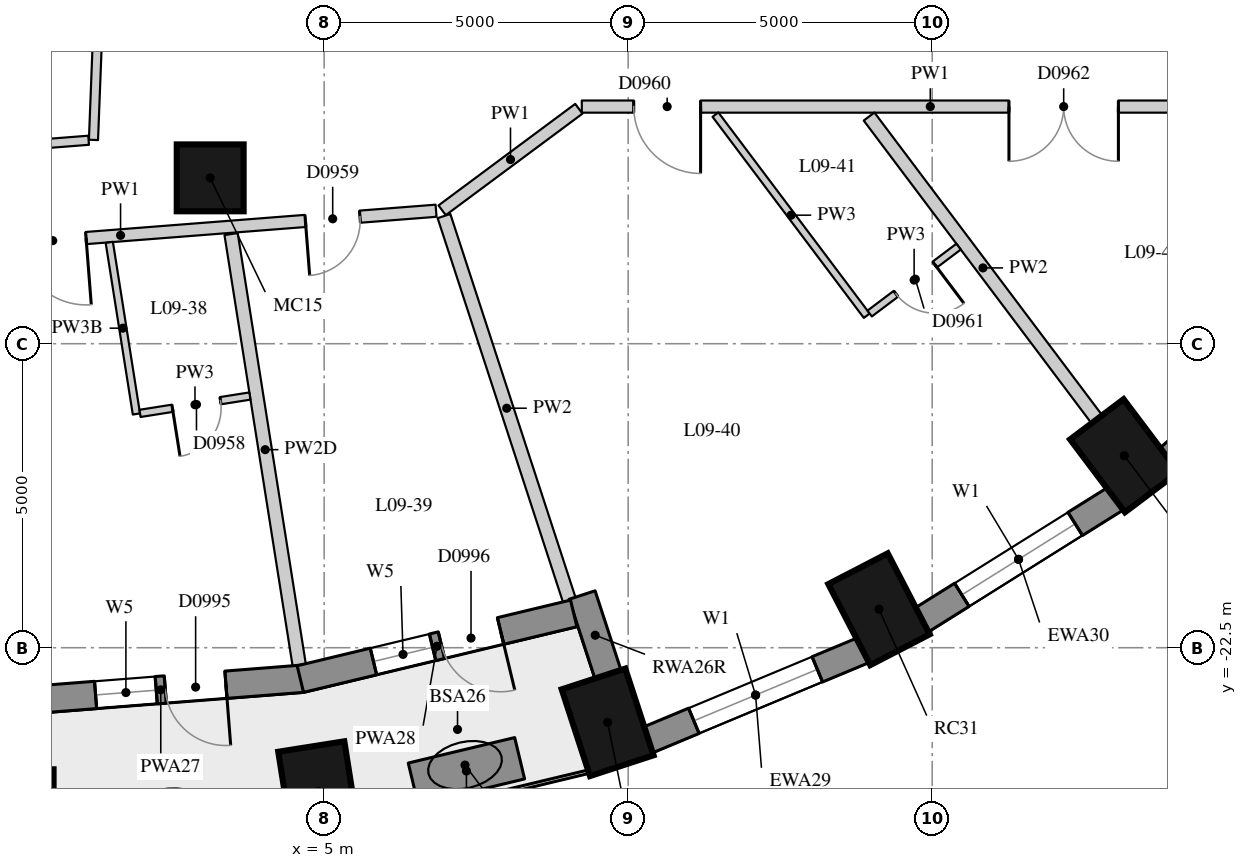
"""IFC4 building model, lengths in metres.
Left out: names, types, materials, properties, quantities, classifications, styles, units other than length and angle.
Written with IfcOpenShell. Run it as: python <this file> out.ifc"""

import sys

from ifc_helpers import new_model, si_unit, direction, frame, frame_2d, origin, origin_2d, place, context, subcontext, project, spatial, rectangle, extrude, element, fill, save


model = new_model("IFC4")
c1 = context("Model", 3, precision=1e-05, world=origin(), true_north=direction((0.0, 1.0)))
c2 = subcontext(c1, "Body", "Model", "MODEL_VIEW")
j1 = project(units=[si_unit("LENGTHUNIT", "METRE"), si_unit("PLANEANGLEUNIT", "RADIAN")], contexts=[c1])
p1 = place(None, origin())
s1 = spatial("IfcSite", under=j1, at=p1, CompositionType="ELEMENT")
p2 = place(p1, origin())
s2 = spatial("IfcBuilding", under=s1, at=p2, CompositionType="ELEMENT")
p3 = place(p2, frame((0.0, 0.0, 38.2)))
s3 = spatial("IfcBuildingStorey", under=s2, at=p3, CompositionType="ELEMENT", Elevation=38.2)
for number, where, z_axis, x_axis in (
    (1, (0.0, -25.25, 0.0), (0.0, 0.0, 1.0), (0.0, -1.0, 0.0)),
    (2, (4.906, -24.866, 0.0), (0.0, 0.0, 1.0), (0.156, -0.988, 0.0)),
    (3, (9.662, -23.727, 0.0), (0.0, 0.0, 1.0), (0.31, -0.951, 0.0)),
    (4, (14.125, -21.867, 0.0), (0.0, 0.0, 1.0), (0.46, -0.888, 0.0)),
    (5, (18.159, -19.343, 0.0), (0.0, 0.0, 1.0), (0.601, -0.799, 0.0)),
):
    element("IfcColumn", number, at=place(p3, frame(where, z_axis=z_axis, x_axis=x_axis)), inside=s3, PredefinedType="COLUMN", context=c2, shape_type="SweptSolid", body=[
        extrude(rectangle(XDim=1.5, YDim=1.1, at=origin_2d()), origin(), (0.0, 0.0, 1.0), 3.3),
    ])
p4 = place(p3, frame((3.126, -14.772, 0.0), z_axis=(0.0, 0.0, 1.0), x_axis=(1.0, 0.0, 0.0)))
e6 = element("IfcColumn", 6, at=p4, inside=s3, PredefinedType="COLUMN", context=c2, shape_type="SweptSolid", body=[
    extrude(rectangle(XDim=1.1, YDim=1.1, at=origin_2d()), origin(), (0.0, 0.0, 1.0), 3.3),
])
p5 = place(p3, frame((10.315, -24.021, 0.0), z_axis=(0.0, 0.0, 1.0), x_axis=(0.923031964282, 0.384723267966, 0.0)))
e7 = element("IfcWall", 7, at=p5, inside=s3, PredefinedType="SOLIDWALL", context=c2, shape_type="SweptSolid", body=[
    extrude(rectangle(XDim=3.856, YDim=0.45, at=frame_2d((1.928, 0.0))), origin(), (0.0, 0.0, 1.0), 3.02),
])
p6 = place(p5, frame((0.828, 0.0, 0.4)))
e8 = element("IfcOpeningElement", 8, at=p6, cuts=e7, PredefinedType="OPENING", context=c2, shape_type="SweptSolid", body=[
    extrude(rectangle(XDim=2.2, YDim=1.75, at=frame_2d((1.1, 0.875))), frame((0.0, 0.235, 0.0), z_axis=(0.0, -1.0, 0.0), x_axis=(1.0, 0.0, 0.0)), (0.0, 0.0, 1.0), 0.47),
])
p7 = place(p3, frame((14.817, -22.051, 0.0), z_axis=(0.0, 0.0, 1.0), x_axis=(0.847635480093, 0.530579016629, 0.0)))
e9 = element("IfcWall", 9, at=p7, inside=s3, PredefinedType="SOLIDWALL", context=c2, shape_type="SweptSolid", body=[
    extrude(rectangle(XDim=3.782, YDim=0.45, at=frame_2d((1.891, 0.0))), origin(), (0.0, 0.0, 1.0), 3.02),
])
p8 = place(p7, frame((0.791, 0.0, 0.4)))
e10 = element("IfcOpeningElement", 10, at=p8, cuts=e9, PredefinedType="OPENING", context=c2, shape_type="SweptSolid", body=[
    extrude(rectangle(XDim=2.2, YDim=1.75, at=frame_2d((1.1, 0.875))), frame((0.0, 0.235, 0.0), z_axis=(0.0, -1.0, 0.0), x_axis=(1.0, 0.0, 0.0)), (0.0, 0.0, 1.0), 0.47),
])
p9 = place(p3, frame((18.871, -19.407, 0.0), z_axis=(0.0, 0.0, 1.0), x_axis=(0.745526233716, 0.66647628228, 0.0)))
e11 = element("IfcWall", 11, at=p9, inside=s3, PredefinedType="SOLIDWALL", context=c2, shape_type="SweptSolid", body=[
    extrude(rectangle(XDim=3.697, YDim=0.45, at=frame_2d((1.848, 0.0))), origin(), (0.0, 0.0, 1.0), 3.02),
])
p10 = place(p3, frame((9.674, -22.956, 0.0), z_axis=(0.0, 0.0, 1.0), x_axis=(-0.310269011655, 0.950648799719, 0.0)))
e12 = element("IfcWall", 12, at=p10, inside=s3, PredefinedType="SOLIDWALL", context=c2, shape_type="SweptSolid", body=[
    extrude(rectangle(XDim=1.39, YDim=0.45, at=frame_2d((0.695, 0.0))), origin(), (0.0, 0.0, 1.0), 3.02),
])
p11 = place(p3, frame((-0.018, -23.376, 0.0), z_axis=(0.0, 0.0, 1.0), x_axis=(0.996935982964, 0.078221773648, 0.0)))
e13 = element("IfcWall", 13, at=p11, inside=s3, PredefinedType="SOLIDWALL", context=c2, shape_type="SweptSolid", body=[
    extrude(rectangle(XDim=4.676, YDim=0.45, at=frame_2d((2.338, 0.0))), origin(), (0.0, 0.0, 1.0), 3.02),
])
p12 = place(p11, frame((1.263, 0.0, 0.4)))
e14 = element("IfcOpeningElement", 14, at=p12, cuts=e13, PredefinedType="OPENING", context=c2, shape_type="SweptSolid", body=[
    extrude(rectangle(XDim=1.0, YDim=1.75, at=frame_2d((0.5, 0.875))), frame((0.0, 0.235, 0.0), z_axis=(0.0, -1.0, 0.0), x_axis=(1.0, 0.0, 0.0)), (0.0, 0.0, 1.0), 0.47),
])
p13 = place(p11, frame((2.413, 0.0, 0.0)))
e15 = element("IfcOpeningElement", 15, at=p13, cuts=e13, PredefinedType="OPENING", context=c2, shape_type="SweptSolid", body=[
    extrude(rectangle(XDim=1.0, YDim=2.15, at=frame_2d((0.5, 1.075))), frame((0.0, 0.235, 0.0), z_axis=(0.0, -1.0, 0.0), x_axis=(1.0, 0.0, 0.0)), (0.0, 0.0, 1.0), 0.47),
])
p14 = place(p3, frame((4.608, -23.016, 0.0), z_axis=(0.0, 0.0, 1.0), x_axis=(0.972343667289, 0.233554688847, 0.0)))
e16 = element("IfcWall", 16, at=p14, inside=s3, PredefinedType="SOLIDWALL", context=c2, shape_type="SweptSolid", body=[
    extrude(rectangle(XDim=4.624, YDim=0.45, at=frame_2d((2.312, 0.0))), origin(), (0.0, 0.0, 1.0), 3.02),
])
p15 = place(p14, frame((1.237, 0.0, 0.4)))
e17 = element("IfcOpeningElement", 17, at=p15, cuts=e16, PredefinedType="OPENING", context=c2, shape_type="SweptSolid", body=[
    extrude(rectangle(XDim=1.0, YDim=1.75, at=frame_2d((0.5, 0.875))), frame((0.0, 0.235, 0.0), z_axis=(0.0, -1.0, 0.0), x_axis=(1.0, 0.0, 0.0)), (0.0, 0.0, 1.0), 0.47),
])
p16 = place(p14, frame((2.387, 0.0, 0.0)))
e18 = element("IfcOpeningElement", 18, at=p16, cuts=e16, PredefinedType="OPENING", context=c2, shape_type="SweptSolid", body=[
    extrude(rectangle(XDim=1.0, YDim=2.15, at=frame_2d((0.5, 1.075))), frame((0.0, 0.235, 0.0), z_axis=(0.0, -1.0, 0.0), x_axis=(1.0, 0.0, 0.0)), (0.0, 0.0, 1.0), 0.47),
])
p17 = place(p3, frame((6.465, -24.737, 0.0), z_axis=(0.0, 0.0, 1.0), x_axis=(0.972504142103, 0.232885580473, 0.0)))
e19 = element("IfcWall", 19, at=p17, inside=s3, PredefinedType="USERDEFINED", context=c2, shape_type="SweptSolid", body=[
    extrude(rectangle(XDim=1.8, YDim=0.7, at=frame_2d((0.9, 0.0))), origin(), (0.0, 0.0, 1.0), 0.75),
])
p18 = place(p3, frame((20.7, -13.6, 0.0), z_axis=(0.0, 0.0, 1.0), x_axis=(-1.0, 0.0, 0.0)))
e20 = element("IfcWall", 20, at=p18, inside=s3, PredefinedType="PARTITIONING", context=c2, shape_type="SweptSolid", body=[
    extrude(rectangle(XDim=11.463, YDim=0.2, at=frame_2d((5.731, 0.0))), origin(), (0.0, 0.0, 1.0), 3.02),
])
p19 = place(p18, frame((9.509, 0.0, 0.0)))
e21 = element("IfcOpeningElement", 21, at=p19, cuts=e20, PredefinedType="OPENING", context=c2, shape_type="SweptSolid", body=[
    extrude(rectangle(XDim=1.1, YDim=2.1, at=frame_2d((0.55, 1.05))), frame((0.0, 0.11, 0.0), z_axis=(0.0, -1.0, 0.0), x_axis=(1.0, 0.0, 0.0)), (0.0, 0.0, 1.0), 0.22),
])
p20 = place(p18, frame((2.638, 0.0, 0.0)))
e22 = element("IfcOpeningElement", 22, at=p20, cuts=e20, PredefinedType="OPENING", context=c2, shape_type="SweptSolid", body=[
    extrude(rectangle(XDim=1.8, YDim=2.1, at=frame_2d((0.9, 1.05))), frame((0.0, 0.11, 0.0), z_axis=(0.0, -1.0, 0.0), x_axis=(1.0, 0.0, 0.0)), (0.0, 0.0, 1.0), 0.22),
])
p21 = place(p3, frame((9.189, -13.636, 0.0), z_axis=(0.0, 0.0, 1.0), x_axis=(-0.8028261118, -0.596213245586, 0.0)))
e23 = element("IfcWall", 23, at=p21, inside=s3, PredefinedType="PARTITIONING", context=c2, shape_type="SweptSolid", body=[
    extrude(rectangle(XDim=2.801, YDim=0.2, at=frame_2d((1.4, 0.0))), origin(), (0.0, 0.0, 1.0), 3.02),
])
p22 = place(p3, frame((6.84, -15.313, 0.0), z_axis=(0.0, 0.0, 1.0), x_axis=(-0.996968882229, -0.077801335898, 0.0)))
e24 = element("IfcWall", 24, at=p22, inside=s3, PredefinedType="PARTITIONING", context=c2, shape_type="SweptSolid", body=[
    extrude(rectangle(XDim=10.409, YDim=0.2, at=frame_2d((5.204, 0.0))), origin(), (0.0, 0.0, 1.0), 3.02),
])
p23 = place(p22, frame((5.773, 0.0, 0.0)))
e25 = element("IfcOpeningElement", 25, at=p23, cuts=e24, PredefinedType="OPENING", context=c2, shape_type="SweptSolid", body=[
    extrude(rectangle(XDim=1.1, YDim=2.1, at=frame_2d((0.55, 1.05))), frame((0.0, 0.11, 0.0), z_axis=(0.0, -1.0, 0.0), x_axis=(1.0, 0.0, 0.0)), (0.0, 0.0, 1.0), 0.22),
])
p24 = place(p22, frame((1.255, 0.0, 0.0)))
e26 = element("IfcOpeningElement", 26, at=p24, cuts=e24, PredefinedType="OPENING", context=c2, shape_type="SweptSolid", body=[
    extrude(rectangle(XDim=0.9, YDim=2.1, at=frame_2d((0.45, 1.05))), frame((0.0, 0.11, 0.0), z_axis=(0.0, -1.0, 0.0), x_axis=(1.0, 0.0, 0.0)), (0.0, 0.0, 1.0), 0.22),
])
p25 = place(p3, frame((1.397, -9.23, 0.0), z_axis=(0.0, 0.0, 1.0), x_axis=(-0.038741742932, -0.99924925687, 0.0)))
e27 = element("IfcWall", 27, at=p25, inside=s3, PredefinedType="PARTITIONING", context=c2, shape_type="SweptSolid", body=[
    extrude(rectangle(XDim=4.922, YDim=0.15, at=frame_2d((2.461, 0.0))), origin(), (0.0, 0.0, 1.0), 3.02),
])
p26 = place(p3, frame((1.126, -14.154, 0.0), z_axis=(0.0, 0.0, 1.0), x_axis=(-0.996959190057, -0.077925434624, 0.0)))
e28 = element("IfcWall", 28, at=p26, inside=s3, PredefinedType="PARTITIONING", context=c2, shape_type="SweptSolid", body=[
    extrude(rectangle(XDim=2.309, YDim=0.15, at=frame_2d((1.155, 0.0))), origin(), (0.0, 0.0, 1.0), 2.42),
])
p27 = place(p3, frame((4.591, -22.789, 0.0), z_axis=(0.0, 0.0, 1.0), x_axis=(-0.156144168019, 0.987734275397, 0.0)))
e29 = element("IfcWall", 29, at=p27, inside=s3, PredefinedType="PARTITIONING", context=c2, shape_type="SweptSolid", body=[
    extrude(rectangle(XDim=7.18, YDim=0.22, at=frame_2d((3.59, 0.0))), origin(), (0.0, 0.0, 1.0), 2.47),
])
p28 = place(p3, frame((9.034, -21.721, 0.0), z_axis=(0.0, 0.0, 1.0), x_axis=(-0.31029478083, 0.95064038889, 0.0)))
e30 = element("IfcWall", 30, at=p28, inside=s3, PredefinedType="PARTITIONING", context=c2, shape_type="SweptSolid", body=[
    extrude(rectangle(XDim=6.648, YDim=0.22, at=frame_2d((3.324, 0.0))), origin(), (0.0, 0.0, 1.0), 3.02),
])
p29 = place(p3, frame((17.708, -18.743, 0.0), z_axis=(0.0, 0.0, 1.0), x_axis=(-0.601177883261, 0.799115231164, 0.0)))
e31 = element("IfcWall", 31, at=p29, inside=s3, PredefinedType="PARTITIONING", context=c2, shape_type="SweptSolid", body=[
    extrude(rectangle(XDim=6.231, YDim=0.22, at=frame_2d((3.116, 0.0))), origin(), (0.0, 0.0, 1.0), 3.02),
])
p30 = place(p3, frame((1.466, -15.833, 0.0), z_axis=(0.0, 0.0, 1.0), x_axis=(0.156164367571, -0.987731081976, 0.0)))
e32 = element("IfcWall", 32, at=p30, inside=s3, PredefinedType="PARTITIONING", context=c2, shape_type="SweptSolid", body=[
    extrude(rectangle(XDim=2.858, YDim=0.12, at=frame_2d((1.429, 0.0))), origin(), (0.0, 0.0, 1.0), 2.47),
])
p31 = place(p3, frame((11.435, -13.732, 0.0), z_axis=(0.0, 0.0, 1.0), x_axis=(0.601178939522, -0.799114436533, 0.0)))
e33 = element("IfcWall", 33, at=p31, inside=s3, PredefinedType="PARTITIONING", context=c2, shape_type="SweptSolid", body=[
    extrude(rectangle(XDim=4.139, YDim=0.12, at=frame_2d((2.07, 0.0))), origin(), (0.0, 0.0, 1.0), 3.02),
])
p32 = place(p3, frame((1.972, -18.646, 0.0), z_axis=(0.0, 0.0, 1.0), x_axis=(0.98774348746, 0.156085883351, 0.0)))
e34 = element("IfcWall", 34, at=p32, inside=s3, PredefinedType="PARTITIONING", context=c2, shape_type="SweptSolid", body=[
    extrude(rectangle(XDim=1.83, YDim=0.12, at=frame_2d((0.915, 0.0))), origin(), (0.0, 0.0, 1.0), 3.02),
])
p33 = place(p32, frame((0.54, 0.0, 0.0)))
e35 = element("IfcOpeningElement", 35, at=p33, cuts=e34, PredefinedType="OPENING", context=c2, shape_type="SweptSolid", body=[
    extrude(rectangle(XDim=0.8, YDim=2.1, at=frame_2d((0.4, 1.05))), frame((0.0, 0.07, 0.0), z_axis=(0.0, -1.0, 0.0), x_axis=(1.0, 0.0, 0.0)), (0.0, 0.0, 1.0), 0.14),
])
p34 = place(p3, frame((13.971, -17.004, 0.0), z_axis=(0.0, 0.0, 1.0), x_axis=(0.799231057954, 0.60102388971, 0.0)))
e36 = element("IfcWall", 36, at=p34, inside=s3, PredefinedType="PARTITIONING", context=c2, shape_type="SweptSolid", body=[
    extrude(rectangle(XDim=1.83, YDim=0.12, at=frame_2d((0.915, 0.0))), origin(), (0.0, 0.0, 1.0), 3.02),
])
p35 = place(p34, frame((0.54, 0.0, 0.0)))
e37 = element("IfcOpeningElement", 37, at=p35, cuts=e36, PredefinedType="OPENING", context=c2, shape_type="SweptSolid", body=[
    extrude(rectangle(XDim=0.8, YDim=2.1, at=frame_2d((0.4, 1.05))), frame((0.0, 0.07, 0.0), z_axis=(0.0, -1.0, 0.0), x_axis=(1.0, 0.0, 0.0)), (0.0, 0.0, 1.0), 0.14),
])
p36 = place(p6, origin())
e38 = element("IfcWindow", 38, at=p36, inside=s3, PartitioningType="SINGLE_PANEL", PredefinedType="WINDOW", context=c2, shape_type="SweptSolid", body=[
    extrude(rectangle(XDim=2.2, YDim=1.75, at=frame_2d((1.1, 0.875))), frame((0.0, 0.035, 0.0), z_axis=(0.0, -1.0, 0.0), x_axis=(1.0, 0.0, 0.0)), (0.0, 0.0, 1.0), 0.06),
])
fill(e8, e38)
p37 = place(p8, origin())
e39 = element("IfcWindow", 39, at=p37, inside=s3, PartitioningType="SINGLE_PANEL", PredefinedType="WINDOW", context=c2, shape_type="SweptSolid", body=[
    extrude(rectangle(XDim=2.2, YDim=1.75, at=frame_2d((1.1, 0.875))), frame((0.0, 0.035, 0.0), z_axis=(0.0, -1.0, 0.0), x_axis=(1.0, 0.0, 0.0)), (0.0, 0.0, 1.0), 0.06),
])
fill(e10, e39)
p38 = place(p12, origin())
e40 = element("IfcWindow", 40, at=p38, inside=s3, PartitioningType="SINGLE_PANEL", PredefinedType="WINDOW", context=c2, shape_type="SweptSolid", body=[
    extrude(rectangle(XDim=1.0, YDim=1.75, at=frame_2d((0.5, 0.875))), frame((0.0, 0.035, 0.0), z_axis=(0.0, -1.0, 0.0), x_axis=(1.0, 0.0, 0.0)), (0.0, 0.0, 1.0), 0.06),
])
fill(e14, e40)
p39 = place(p13, frame((1.0, 0.0, 0.0), z_axis=(0.0, 0.0, 1.0), x_axis=(-1.0, 0.0, 0.0)))
e41 = element("IfcDoor", 41, at=p39, inside=s3, OperationType="SINGLE_SWING_LEFT", PredefinedType="DOOR", context=c2, shape_type="SweptSolid", body=[
    extrude(rectangle(XDim=1.0, YDim=2.15, at=frame_2d((0.5, 1.075))), frame((0.0, 0.075, 0.0), z_axis=(0.0, -1.0, 0.0), x_axis=(1.0, 0.0, 0.0)), (0.0, 0.0, 1.0), 0.05),
])
fill(e15, e41)
p40 = place(p15, origin())
e42 = element("IfcWindow", 42, at=p40, inside=s3, PartitioningType="SINGLE_PANEL", PredefinedType="WINDOW", context=c2, shape_type="SweptSolid", body=[
    extrude(rectangle(XDim=1.0, YDim=1.75, at=frame_2d((0.5, 0.875))), frame((0.0, 0.035, 0.0), z_axis=(0.0, -1.0, 0.0), x_axis=(1.0, 0.0, 0.0)), (0.0, 0.0, 1.0), 0.06),
])
fill(e17, e42)
p41 = place(p16, frame((1.0, 0.0, 0.0), z_axis=(0.0, 0.0, 1.0), x_axis=(-1.0, 0.0, 0.0)))
e43 = element("IfcDoor", 43, at=p41, inside=s3, OperationType="SINGLE_SWING_LEFT", PredefinedType="DOOR", context=c2, shape_type="SweptSolid", body=[
    extrude(rectangle(XDim=1.0, YDim=2.15, at=frame_2d((0.5, 1.075))), frame((0.0, 0.075, 0.0), z_axis=(0.0, -1.0, 0.0), x_axis=(1.0, 0.0, 0.0)), (0.0, 0.0, 1.0), 0.05),
])
fill(e18, e43)
p42 = place(p23, origin())
e44 = element("IfcDoor", 44, at=p42, inside=s3, OperationType="SINGLE_SWING_LEFT", PredefinedType="DOOR", context=c2, shape_type="SweptSolid", body=[
    extrude(rectangle(XDim=1.1, YDim=2.1, at=frame_2d((0.55, 1.05))), frame((0.0, 0.025, 0.0), z_axis=(0.0, -1.0, 0.0), x_axis=(1.0, 0.0, 0.0)), (0.0, 0.0, 1.0), 0.05),
])
fill(e25, e44)
p43 = place(p33, origin())
e45 = element("IfcDoor", 45, at=p43, inside=s3, OperationType="SINGLE_SWING_RIGHT", PredefinedType="DOOR", context=c2, shape_type="SweptSolid", body=[
    extrude(rectangle(XDim=0.8, YDim=2.1, at=frame_2d((0.4, 1.05))), frame((0.0, 0.025, 0.0), z_axis=(0.0, -1.0, 0.0), x_axis=(1.0, 0.0, 0.0)), (0.0, 0.0, 1.0), 0.05),
])
fill(e35, e45)
p44 = place(p24, origin())
e46 = element("IfcDoor", 46, at=p44, inside=s3, OperationType="SINGLE_SWING_RIGHT", PredefinedType="DOOR", context=c2, shape_type="SweptSolid", body=[
    extrude(rectangle(XDim=0.9, YDim=2.1, at=frame_2d((0.45, 1.05))), frame((0.0, 0.025, 0.0), z_axis=(0.0, -1.0, 0.0), x_axis=(1.0, 0.0, 0.0)), (0.0, 0.0, 1.0), 0.05),
])
fill(e26, e46)
p45 = place(p19, origin())
e47 = element("IfcDoor", 47, at=p45, inside=s3, OperationType="SINGLE_SWING_LEFT", PredefinedType="DOOR", context=c2, shape_type="SweptSolid", body=[
    extrude(rectangle(XDim=1.1, YDim=2.1, at=frame_2d((0.55, 1.05))), frame((0.0, 0.025, 0.0), z_axis=(0.0, -1.0, 0.0), x_axis=(1.0, 0.0, 0.0)), (0.0, 0.0, 1.0), 0.05),
])
fill(e21, e47)
p46 = place(p35, origin())
e48 = element("IfcDoor", 48, at=p46, inside=s3, OperationType="SINGLE_SWING_LEFT", PredefinedType="DOOR", context=c2, shape_type="SweptSolid", body=[
    extrude(rectangle(XDim=0.8, YDim=2.1, at=frame_2d((0.4, 1.05))), frame((0.0, 0.025, 0.0), z_axis=(0.0, -1.0, 0.0), x_axis=(1.0, 0.0, 0.0)), (0.0, 0.0, 1.0), 0.05),
])
fill(e37, e48)
p47 = place(p20, origin())
e49 = element("IfcDoor", 49, at=p47, inside=s3, OperationType="DOUBLE_DOOR_SINGLE_SWING", PredefinedType="DOOR", context=c2, shape_type="SweptSolid", body=[
    extrude(rectangle(XDim=1.8, YDim=2.1, at=frame_2d((0.9, 1.05))), frame((0.0, 0.025, 0.0), z_axis=(0.0, -1.0, 0.0), x_axis=(1.0, 0.0, 0.0)), (0.0, 0.0, 1.0), 0.05),
])
fill(e22, e49)
save(model, sys.argv[1])
